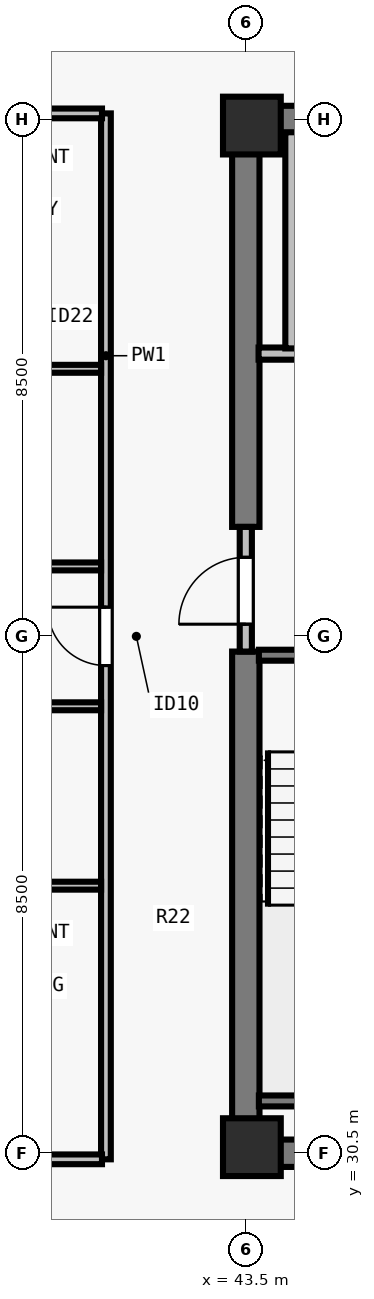
"""IFC4 building model, lengths in metres.
Left out: names, types, materials, properties, quantities, classifications, styles, units other than length and angle.
Written with IfcOpenShell. Run it as: python <this file> out.ifc"""

import sys

from ifc_helpers import new_model, si_unit, direction, frame, frame_2d, origin, origin_2d, place, context, subcontext, project, spatial, rectangle, extrude, element, fill, save


model = new_model("IFC4")
c1 = context("Model", 3, precision=1e-05, world=origin(), true_north=direction((0.0, 1.0)))
c2 = subcontext(c1, "Body", "Model", "MODEL_VIEW")
j1 = project(units=[si_unit("LENGTHUNIT", "METRE"), si_unit("PLANEANGLEUNIT", "RADIAN")], contexts=[c1])
p1 = place(None, origin())
s1 = spatial("IfcSite", under=j1, at=p1, CompositionType="ELEMENT")
p2 = place(p1, origin())
s2 = spatial("IfcBuilding", under=s1, at=p2, CompositionType="ELEMENT")
p3 = place(p2, frame((0.0, 0.0, 209.5)))
s3 = spatial("IfcBuildingStorey", under=s2, at=p3, CompositionType="ELEMENT", Elevation=209.5)
for number, where, z_axis, x_axis in (
    (1, (43.6, 30.6, 0.0), (0.0, 0.0, 1.0), (1.0, 0.0, 0.0)),
    (2, (43.6, 47.4, 0.0), (0.0, 0.0, 1.0), (1.0, 0.0, 0.0)),
):
    element("IfcColumn", number, at=place(p3, frame(where, z_axis=z_axis, x_axis=x_axis)), inside=s3, PredefinedType="COLUMN", context=c2, shape_type="SweptSolid", body=[
        extrude(rectangle(XDim=0.95, YDim=0.95, at=origin_2d()), origin(), (0.0, 0.0, 1.0), 3.5),
    ])
for number, where, z_axis, x_axis in (
    (3, (43.275, 30.5, 0.0), (0.0, 0.0, 1.0), (1.0, 0.0, 0.0)),
    (4, (43.275, 47.5, 0.0), (0.0, 0.0, 1.0), (1.0, 0.0, 0.0)),
):
    element("IfcWall", number, at=place(p3, frame(where, z_axis=z_axis, x_axis=x_axis)), inside=s3, PredefinedType="SHEAR", context=c2, shape_type="SweptSolid", body=[
        extrude(rectangle(XDim=17.45, YDim=0.45, at=frame_2d((8.725, 0.0))), origin(), (0.0, 0.0, 1.0), 3.29),
    ])
p4 = place(p3, frame((43.5, 30.715, 0.0), z_axis=(0.0, 0.0, 1.0), x_axis=(0.0, 1.0, 0.0)))
e5 = element("IfcWall", 5, at=p4, inside=s3, PredefinedType="SHEAR", context=c2, shape_type="SweptSolid", body=[
    extrude(rectangle(XDim=8.035, YDim=0.45, at=frame_2d((4.018, 0.0))), origin(), (0.0, 0.0, 1.0), 3.29),
])
p5 = place(p3, frame((43.5, 40.8, 0.0), z_axis=(0.0, 0.0, 1.0), x_axis=(0.0, 1.0, 0.0)))
e6 = element("IfcWall", 6, at=p5, inside=s3, PredefinedType="SHEAR", context=c2, shape_type="SweptSolid", body=[
    extrude(rectangle(XDim=6.485, YDim=0.45, at=frame_2d((3.242, 0.0))), origin(), (0.0, 0.0, 1.0), 3.29),
])
p6 = place(p3, frame((43.5, 38.75, 0.0), z_axis=(0.0, 0.0, 1.0), x_axis=(0.0, 1.0, 0.0)))
e7 = element("IfcWall", 7, at=p6, inside=s3, PredefinedType="SOLIDWALL", context=c2, shape_type="SweptSolid", body=[
    extrude(rectangle(XDim=2.05, YDim=0.2, at=frame_2d((1.025, 0.0))), origin(), (0.0, 0.0, 1.0), 3.29),
])
p7 = place(p6, frame((0.45, 0.0, 0.0)))
e8 = element("IfcOpeningElement", 8, at=p7, cuts=e7, PredefinedType="OPENING", context=c2, shape_type="SweptSolid", body=[
    extrude(rectangle(XDim=1.1, YDim=2.15, at=frame_2d((0.55, 1.075))), frame((0.0, 0.11, 0.0), z_axis=(0.0, -1.0, 0.0), x_axis=(1.0, 0.0, 0.0)), (0.0, 0.0, 1.0), 0.22),
])
p8 = place(p3, frame((43.71, 43.65, 0.0), z_axis=(0.0, 0.0, 1.0), x_axis=(1.0, 0.0, 0.0)))
e9 = element("IfcWall", 9, at=p8, inside=s3, PredefinedType="SOLIDWALL", context=c2, shape_type="SweptSolid", body=[
    extrude(rectangle(XDim=3.555, YDim=0.2, at=frame_2d((1.777, 0.0))), origin(), (0.0, 0.0, 1.0), 3.29),
])
p9 = place(p8, frame((1.16, 0.0, 0.0)))
e10 = element("IfcOpeningElement", 10, at=p9, cuts=e9, PredefinedType="OPENING", context=c2, shape_type="SweptSolid", body=[
    extrude(rectangle(XDim=1.1, YDim=2.2, at=frame_2d((0.55, 1.1))), frame((0.0, 0.11, 0.0), z_axis=(0.0, -1.0, 0.0), x_axis=(1.0, 0.0, 0.0)), (0.0, 0.0, 1.0), 0.22),
])
p10 = place(p3, frame((44.25, 43.735, 0.0), z_axis=(0.0, 0.0, 1.0), x_axis=(0.0, 1.0, 0.0)))
e11 = element("IfcWall", 11, at=p10, inside=s3, PredefinedType="SOLIDWALL", context=c2, shape_type="SweptSolid", body=[
    extrude(rectangle(XDim=3.555, YDim=0.2, at=frame_2d((1.777, 0.0))), origin(), (0.0, 0.0, 1.0), 3.29),
])
p11 = place(p3, frame((41.2, 30.4, 0.0), z_axis=(0.0, 0.0, 1.0), x_axis=(0.0, 1.0, 0.0)))
e12 = element("IfcWall", 12, at=p11, inside=s3, PredefinedType="PARTITIONING", context=c2, shape_type="SweptSolid", body=[
    extrude(rectangle(XDim=17.2, YDim=0.16, at=frame_2d((8.6, 0.0))), origin(), (0.0, 0.0, 1.0), 3.29),
])
p12 = place(p11, frame((8.12, 0.0, 0.0)))
e13 = element("IfcOpeningElement", 13, at=p12, cuts=e12, PredefinedType="OPENING", context=c2, shape_type="SweptSolid", body=[
    extrude(rectangle(XDim=0.96, YDim=2.18, at=frame_2d((0.48, 1.09))), frame((0.0, 0.09, 0.0), z_axis=(0.0, -1.0, 0.0), x_axis=(1.0, 0.0, 0.0)), (0.0, 0.0, 1.0), 0.18),
])
for number, where, z_axis, x_axis in (
    (14, (29.805, 30.4, 0.0), (0.0, 0.0, 1.0), (1.0, 0.0, 0.0)),
    (15, (29.805, 47.6, 0.0), (0.0, 0.0, 1.0), (1.0, 0.0, 0.0)),
):
    element("IfcWall", number, at=place(p3, frame(where, z_axis=z_axis, x_axis=x_axis)), inside=s3, PredefinedType="PARTITIONING", context=c2, shape_type="SweptSolid", body=[
        extrude(rectangle(XDim=11.33, YDim=0.16, at=frame_2d((5.665, 0.0))), origin(), (0.0, 0.0, 1.0), 3.29),
    ])
p13 = place(p3, frame((38.37, 34.9, 0.0), z_axis=(0.0, 0.0, 1.0), x_axis=(1.0, 0.0, 0.0)))
e16 = element("IfcWall", 16, at=p13, inside=s3, PredefinedType="PLUMBINGWALL", context=c2, shape_type="SweptSolid", body=[
    extrude(rectangle(XDim=2.75, YDim=0.13, at=frame_2d((1.375, 0.0))), origin(), (0.0, 0.0, 1.0), 3.29),
])
p14 = place(p3, frame((38.37, 37.85, 0.0), z_axis=(0.0, 0.0, 1.0), x_axis=(1.0, 0.0, 0.0)))
e17 = element("IfcWall", 17, at=p14, inside=s3, PredefinedType="PLUMBINGWALL", context=c2, shape_type="SweptSolid", body=[
    extrude(rectangle(XDim=2.75, YDim=0.13, at=frame_2d((1.375, 0.0))), origin(), (0.0, 0.0, 1.0), 3.29),
])
p15 = place(p14, frame((0.55, 0.0, 0.0)))
e18 = element("IfcOpeningElement", 18, at=p15, cuts=e17, PredefinedType="OPENING", context=c2, shape_type="SweptSolid", body=[
    extrude(rectangle(XDim=0.85, YDim=2.08, at=frame_2d((0.425, 1.04))), frame((0.0, 0.075, 0.0), z_axis=(0.0, -1.0, 0.0), x_axis=(1.0, 0.0, 0.0)), (0.0, 0.0, 1.0), 0.15),
])
p16 = place(p3, frame((38.37, 43.4, 0.0), z_axis=(0.0, 0.0, 1.0), x_axis=(1.0, 0.0, 0.0)))
e19 = element("IfcWall", 19, at=p16, inside=s3, PredefinedType="PLUMBINGWALL", context=c2, shape_type="SweptSolid", body=[
    extrude(rectangle(XDim=2.75, YDim=0.13, at=frame_2d((1.375, 0.0))), origin(), (0.0, 0.0, 1.0), 2.958),
])
p17 = place(p3, frame((38.37, 40.15, 0.0), z_axis=(0.0, 0.0, 1.0), x_axis=(1.0, 0.0, 0.0)))
e20 = element("IfcWall", 20, at=p17, inside=s3, PredefinedType="PLUMBINGWALL", context=c2, shape_type="SweptSolid", body=[
    extrude(rectangle(XDim=2.75, YDim=0.13, at=frame_2d((1.375, 0.0))), origin(), (0.0, 0.0, 1.0), 3.29),
])
p18 = place(p17, frame((0.55, 0.0, 0.0)))
e21 = element("IfcOpeningElement", 21, at=p18, cuts=e20, PredefinedType="OPENING", context=c2, shape_type="SweptSolid", body=[
    extrude(rectangle(XDim=0.88, YDim=2.1, at=frame_2d((0.44, 1.05))), frame((0.0, 0.075, 0.0), z_axis=(0.0, -1.0, 0.0), x_axis=(1.0, 0.0, 0.0)), (0.0, 0.0, 1.0), 0.15),
])
p19 = place(p3, frame((43.715, 38.69, 0.0), z_axis=(0.0, 0.0, 1.0), x_axis=(1.0, 0.0, 0.0)))
e22 = element("IfcWall", 22, at=p19, inside=s3, PredefinedType="SOLIDWALL", context=c2, shape_type="SweptSolid", body=[
    extrude(rectangle(XDim=3.28, YDim=0.18, at=frame_2d((1.64, 0.0))), origin(), (0.0, 0.0, 1.0), 3.29),
])
p20 = place(p19, frame((1.165, 0.0, 0.0)))
e23 = element("IfcOpeningElement", 23, at=p20, cuts=e22, PredefinedType="OPENING", context=c2, shape_type="SweptSolid", body=[
    extrude(rectangle(XDim=0.95, YDim=2.15, at=frame_2d((0.475, 1.075))), frame((0.0, 0.1, 0.0), z_axis=(0.0, -1.0, 0.0), x_axis=(1.0, 0.0, 0.0)), (0.0, 0.0, 1.0), 0.2),
])
p21 = place(p3, frame((43.715, 31.36, 0.0), z_axis=(0.0, 0.0, 1.0), x_axis=(1.0, 0.0, 0.0)))
e24 = element("IfcWall", 24, at=p21, inside=s3, PredefinedType="SOLIDWALL", context=c2, shape_type="SweptSolid", body=[
    extrude(rectangle(XDim=3.28, YDim=0.18, at=frame_2d((1.64, 0.0))), origin(), (0.0, 0.0, 1.0), 3.29),
])
p22 = place(p7, origin())
e25 = element("IfcDoor", 25, at=p22, inside=s3, OperationType="SINGLE_SWING_LEFT", PredefinedType="DOOR", context=c2, shape_type="SweptSolid", body=[
    extrude(rectangle(XDim=1.1, YDim=2.15, at=frame_2d((0.55, 1.075))), frame((0.0, 0.025, 0.0), z_axis=(0.0, -1.0, 0.0), x_axis=(1.0, 0.0, 0.0)), (0.0, 0.0, 1.0), 0.05),
])
fill(e8, e25)
p23 = place(p12, origin())
e26 = element("IfcDoor", 26, at=p23, inside=s3, OperationType="SINGLE_SWING_RIGHT", PredefinedType="DOOR", context=c2, shape_type="SweptSolid", body=[
    extrude(rectangle(XDim=0.96, YDim=2.18, at=frame_2d((0.48, 1.09))), frame((0.0, 0.025, 0.0), z_axis=(0.0, -1.0, 0.0), x_axis=(1.0, 0.0, 0.0)), (0.0, 0.0, 1.0), 0.05),
])
fill(e13, e26)
save(model, sys.argv[1])
